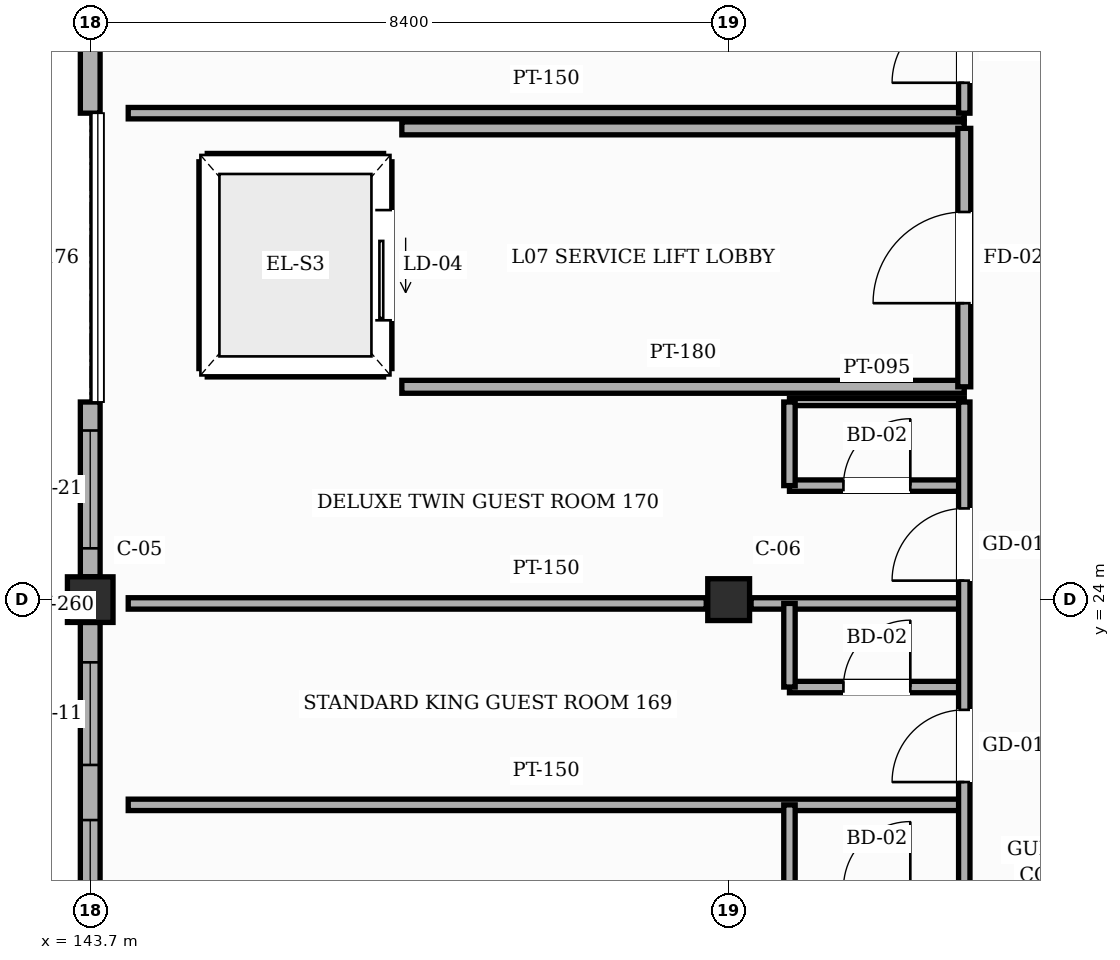
"""IFC4 building model, lengths in metres.
Left out: names, types, materials, properties, quantities, classifications, styles, units other than length and angle.
Written with IfcOpenShell. Run it as: python <this file> out.ifc"""

import sys

from ifc_helpers import new_model, si_unit, direction, frame, frame_2d, origin, origin_2d, place, context, subcontext, project, spatial, rectangle, hollow_rectangle, extrude, element, fill, save


model = new_model("IFC4")
c1 = context("Model", 3, precision=1e-05, world=origin(), true_north=direction((0.0, 1.0)))
c2 = subcontext(c1, "Body", "Model", "MODEL_VIEW")
j1 = project(units=[si_unit("LENGTHUNIT", "METRE"), si_unit("PLANEANGLEUNIT", "RADIAN")], contexts=[c1])
p1 = place(None, origin())
s1 = spatial("IfcSite", under=j1, at=p1, CompositionType="ELEMENT")
p2 = place(p1, origin())
s2 = spatial("IfcBuilding", under=s1, at=p2, CompositionType="ELEMENT")
p3 = place(p2, frame((0.0, 0.0, 31.8)))
s3 = spatial("IfcBuildingStorey", under=s2, at=p3, CompositionType="ELEMENT", Elevation=31.8)
p4 = place(p3, frame((143.7, 24.0, 0.0), z_axis=(0.0, 0.0, 1.0), x_axis=(1.0, 0.0, 0.0)))
e1 = element("IfcColumn", 1, at=p4, inside=s3, PredefinedType="COLUMN", context=c2, shape_type="SweptSolid", body=[
    extrude(hollow_rectangle(XDim=0.6, YDim=0.6, WallThickness=0.025, InnerFilletRadius=0.025, OuterFilletRadius=0.05, at=origin_2d()), origin(), (0.0, 0.0, 1.0), 3.6),
])
p5 = place(p3, frame((152.1, 24.0, 0.0), z_axis=(0.0, 0.0, 1.0), x_axis=(1.0, 0.0, 0.0)))
e2 = element("IfcColumn", 2, at=p5, inside=s3, PredefinedType="COLUMN", context=c2, shape_type="SweptSolid", body=[
    extrude(hollow_rectangle(XDim=0.55, YDim=0.55, WallThickness=0.022, InnerFilletRadius=0.022, OuterFilletRadius=0.044, at=origin_2d()), origin(), (0.0, 0.0, 1.0), 3.6),
])
p6 = place(p3, frame((143.7, 16.3, 0.0), z_axis=(0.0, 0.0, 1.0), x_axis=(0.0, 1.0, 0.0)))
e3 = element("IfcWall", 3, at=p6, inside=s3, PredefinedType="SOLIDWALL", context=c2, shape_type="SweptSolid", body=[
    extrude(rectangle(XDim=7.4, YDim=0.26, at=frame_2d((3.7, 0.0))), origin(), (0.0, 0.0, 1.0), 2.805),
])
p7 = place(p6, frame((0.2, 0.0, 0.85)))
e4 = element("IfcOpeningElement", 4, at=p7, cuts=e3, PredefinedType="OPENING", context=c2, shape_type="SweptSolid", body=[
    extrude(rectangle(XDim=1.95, YDim=1.65, at=frame_2d((0.975, 0.825))), frame((0.0, 0.14, 0.0), z_axis=(0.0, -1.0, 0.0), x_axis=(1.0, 0.0, 0.0)), (0.0, 0.0, 1.0), 0.28),
])
p8 = place(p6, frame((2.55, 0.0, 0.85)))
e5 = element("IfcOpeningElement", 5, at=p8, cuts=e3, PredefinedType="OPENING", context=c2, shape_type="SweptSolid", body=[
    extrude(rectangle(XDim=2.25, YDim=1.65, at=frame_2d((1.125, 0.825))), frame((0.0, 0.14, 0.0), z_axis=(0.0, -1.0, 0.0), x_axis=(1.0, 0.0, 0.0)), (0.0, 0.0, 1.0), 0.28),
])
p9 = place(p6, frame((5.525, 0.0, 0.85)))
e6 = element("IfcOpeningElement", 6, at=p9, cuts=e3, PredefinedType="OPENING", context=c2, shape_type="SweptSolid", body=[
    extrude(rectangle(XDim=1.35, YDim=1.35, at=frame_2d((0.675, 0.675))), frame((0.0, 0.14, 0.0), z_axis=(0.0, -1.0, 0.0), x_axis=(1.0, 0.0, 0.0)), (0.0, 0.0, 1.0), 0.28),
])
p10 = place(p3, frame((143.7, 24.3, 0.0), z_axis=(0.0, 0.0, 1.0), x_axis=(0.0, 1.0, 0.0)))
e7 = element("IfcWall", 7, at=p10, inside=s3, PredefinedType="SOLIDWALL", context=c2, shape_type="SweptSolid", body=[
    extrude(rectangle(XDim=2.3, YDim=0.26, at=frame_2d((1.15, 0.0))), origin(), (0.0, 0.0, 1.0), 2.805),
])
p11 = place(p10, frame((0.375, 0.0, 0.85)))
e8 = element("IfcOpeningElement", 8, at=p11, cuts=e7, PredefinedType="OPENING", context=c2, shape_type="SweptSolid", body=[
    extrude(rectangle(XDim=1.55, YDim=1.35, at=frame_2d((0.775, 0.675))), frame((0.0, 0.14, 0.0), z_axis=(0.0, -1.0, 0.0), x_axis=(1.0, 0.0, 0.0)), (0.0, 0.0, 1.0), 0.28),
])
p12 = place(p3, frame((143.7, 30.4, 0.0), z_axis=(0.0, 0.0, 1.0), x_axis=(0.0, 1.0, 0.0)))
e9 = element("IfcWall", 9, at=p12, inside=s3, PredefinedType="SOLIDWALL", context=c2, shape_type="SweptSolid", body=[
    extrude(rectangle(XDim=1.3, YDim=0.26, at=frame_2d((0.65, 0.0))), origin(), (0.0, 0.0, 1.0), 2.805),
])
for number, where, z_axis, x_axis in (
    (10, (145.24, 29.76, 0.0), (0.0, 0.0, 1.0), (1.0, 0.0, 0.0)),
    (11, (145.24, 27.04, 0.0), (0.0, 0.0, 1.0), (1.0, 0.0, 0.0)),
):
    element("IfcWall", number, at=place(p3, frame(where, z_axis=z_axis, x_axis=x_axis)), inside=s3, PredefinedType="SHEAR", context=c2, shape_type="SweptSolid", body=[
        extrude(rectangle(XDim=2.32, YDim=0.22, at=frame_2d((1.16, 0.0))), origin(), (0.0, 0.0, 1.0), 3.38),
    ])
p13 = place(p3, frame((147.56, 27.04, 0.0), z_axis=(0.0, 0.0, 1.0), x_axis=(0.0, 1.0, 0.0)))
e12 = element("IfcWall", 12, at=p13, inside=s3, PredefinedType="SHEAR", context=c2, shape_type="SweptSolid", body=[
    extrude(rectangle(XDim=2.72, YDim=0.22, at=frame_2d((1.36, 0.0))), origin(), (0.0, 0.0, 1.0), 3.38),
])
p14 = place(p13, frame((0.635, 0.0, 0.0)))
e13 = element("IfcOpeningElement", 13, at=p14, cuts=e12, PredefinedType="OPENING", context=c2, shape_type="SweptSolid", body=[
    extrude(rectangle(XDim=1.45, YDim=2.35, at=frame_2d((0.725, 1.175))), frame((0.0, 0.12, 0.0), z_axis=(0.0, -1.0, 0.0), x_axis=(1.0, 0.0, 0.0)), (0.0, 0.0, 1.0), 0.24),
])
p15 = place(p3, frame((145.24, 27.04, 0.0), z_axis=(0.0, 0.0, 1.0), x_axis=(0.0, 1.0, 0.0)))
e14 = element("IfcWall", 14, at=p15, inside=s3, PredefinedType="SHEAR", context=c2, shape_type="SweptSolid", body=[
    extrude(rectangle(XDim=2.72, YDim=0.22, at=frame_2d((1.36, 0.0))), origin(), (0.0, 0.0, 1.0), 3.38),
])
p16 = place(p3, frame((144.2, 21.3, 0.0), z_axis=(0.0, 0.0, 1.0), x_axis=(1.0, 0.0, 0.0)))
e15 = element("IfcWall", 15, at=p16, inside=s3, PredefinedType="PARTITIONING", context=c2, shape_type="SweptSolid", body=[
    extrude(rectangle(XDim=11.0, YDim=0.15, at=frame_2d((5.5, 0.0))), origin(), (0.0, 0.0, 1.0), 3.365),
])
p17 = place(p3, frame((152.9, 22.85, 0.0), z_axis=(0.0, 0.0, 1.0), x_axis=(1.0, 0.0, 0.0)))
e16 = element("IfcWall", 16, at=p17, inside=s3, PredefinedType="PARTITIONING", context=c2, shape_type="SweptSolid", body=[
    extrude(rectangle(XDim=2.3, YDim=0.15, at=frame_2d((1.15, 0.0))), origin(), (0.0, 0.0, 1.0), 3.365),
])
p18 = place(p17, frame((0.71, 0.0, 0.0)))
e17 = element("IfcOpeningElement", 17, at=p18, cuts=e16, PredefinedType="OPENING", context=c2, shape_type="SweptSolid", body=[
    extrude(rectangle(XDim=0.88, YDim=2.12, at=frame_2d((0.44, 1.06))), frame((0.0, 0.085, 0.0), z_axis=(0.0, -1.0, 0.0), x_axis=(1.0, 0.0, 0.0)), (0.0, 0.0, 1.0), 0.17),
])
p19 = place(p3, frame((144.2, 23.95, 0.0), z_axis=(0.0, 0.0, 1.0), x_axis=(1.0, 0.0, 0.0)))
e18 = element("IfcWall", 18, at=p19, inside=s3, PredefinedType="PARTITIONING", context=c2, shape_type="SweptSolid", body=[
    extrude(rectangle(XDim=7.605, YDim=0.15, at=frame_2d((3.802, 0.0))), origin(), (0.0, 0.0, 1.0), 2.755),
])
p20 = place(p3, frame((152.395, 23.95, 0.0), z_axis=(0.0, 0.0, 1.0), x_axis=(1.0, 0.0, 0.0)))
e19 = element("IfcWall", 19, at=p20, inside=s3, PredefinedType="PARTITIONING", context=c2, shape_type="SweptSolid", body=[
    extrude(rectangle(XDim=2.805, YDim=0.15, at=frame_2d((1.402, 0.0))), origin(), (0.0, 0.0, 1.0), 2.755),
])
p21 = place(p3, frame((152.9, 25.5, 0.0), z_axis=(0.0, 0.0, 1.0), x_axis=(1.0, 0.0, 0.0)))
e20 = element("IfcWall", 20, at=p21, inside=s3, PredefinedType="PARTITIONING", context=c2, shape_type="SweptSolid", body=[
    extrude(rectangle(XDim=2.3, YDim=0.15, at=frame_2d((1.15, 0.0))), origin(), (0.0, 0.0, 1.0), 3.365),
])
p22 = place(p21, frame((0.71, 0.0, 0.0)))
e21 = element("IfcOpeningElement", 21, at=p22, cuts=e20, PredefinedType="OPENING", context=c2, shape_type="SweptSolid", body=[
    extrude(rectangle(XDim=0.88, YDim=2.12, at=frame_2d((0.44, 1.06))), frame((0.0, 0.085, 0.0), z_axis=(0.0, -1.0, 0.0), x_axis=(1.0, 0.0, 0.0)), (0.0, 0.0, 1.0), 0.17),
])
p23 = place(p3, frame((152.9, 26.6, 0.0), z_axis=(0.0, 0.0, 1.0), x_axis=(1.0, 0.0, 0.0)))
e22 = element("IfcWall", 22, at=p23, inside=s3, PredefinedType="PARTITIONING", context=c2, shape_type="SweptSolid", body=[
    extrude(rectangle(XDim=2.3, YDim=0.095, at=frame_2d((1.15, 0.0))), origin(), (0.0, 0.0, 1.0), 3.365),
])
for number, where, z_axis, x_axis in (
    (23, (147.8, 26.8, 0.0), (0.0, 0.0, 1.0), (1.0, 0.0, 0.0)),
    (24, (147.8, 30.2, 0.0), (0.0, 0.0, 1.0), (1.0, 0.0, 0.0)),
):
    element("IfcWall", number, at=place(p3, frame(where, z_axis=z_axis, x_axis=x_axis)), inside=s3, PredefinedType="PARTITIONING", context=c2, shape_type="SweptSolid", body=[
        extrude(rectangle(XDim=7.4, YDim=0.17, at=frame_2d((3.7, 0.0))), origin(), (0.0, 0.0, 1.0), 3.365),
    ])
p24 = place(p3, frame((144.2, 30.4, 0.0), z_axis=(0.0, 0.0, 1.0), x_axis=(1.0, 0.0, 0.0)))
e25 = element("IfcWall", 25, at=p24, inside=s3, PredefinedType="PARTITIONING", context=c2, shape_type="SweptSolid", body=[
    extrude(rectangle(XDim=11.0, YDim=0.15, at=frame_2d((5.5, 0.0))), origin(), (0.0, 0.0, 1.0), 3.365),
])
p25 = place(p3, frame((152.9, 20.2, 0.0), z_axis=(0.0, 0.0, 1.0), x_axis=(0.0, 1.0, 0.0)))
e26 = element("IfcWall", 26, at=p25, inside=s3, PredefinedType="PARTITIONING", context=c2, shape_type="SweptSolid", body=[
    extrude(rectangle(XDim=1.1, YDim=0.15, at=frame_2d((0.55, 0.0))), origin(), (0.0, 0.0, 1.0), 3.365),
])
p26 = place(p3, frame((152.9, 22.85, 0.0), z_axis=(0.0, 0.0, 1.0), x_axis=(0.0, 1.0, 0.0)))
e27 = element("IfcWall", 27, at=p26, inside=s3, PredefinedType="PARTITIONING", context=c2, shape_type="SweptSolid", body=[
    extrude(rectangle(XDim=1.1, YDim=0.15, at=frame_2d((0.55, 0.0))), origin(), (0.0, 0.0, 1.0), 3.365),
])
p27 = place(p3, frame((152.9, 25.5, 0.0), z_axis=(0.0, 0.0, 1.0), x_axis=(0.0, 1.0, 0.0)))
e28 = element("IfcWall", 28, at=p27, inside=s3, PredefinedType="PARTITIONING", context=c2, shape_type="SweptSolid", body=[
    extrude(rectangle(XDim=1.1, YDim=0.15, at=frame_2d((0.55, 0.0))), origin(), (0.0, 0.0, 1.0), 3.365),
])
p28 = place(p3, frame((155.2, 8.4, 0.0), z_axis=(0.0, 0.0, 1.0), x_axis=(0.0, 1.0, 0.0)))
e29 = element("IfcWall", 29, at=p28, inside=s3, PredefinedType="PARTITIONING", context=c2, shape_type="SweptSolid", body=[
    extrude(rectangle(XDim=18.2, YDim=0.15, at=frame_2d((9.1, 0.0))), origin(), (0.0, 0.0, 1.0), 3.365),
])
p29 = place(p28, frame((3.05, 0.0, 0.0)))
e30 = element("IfcOpeningElement", 30, at=p29, cuts=e29, PredefinedType="OPENING", context=c2, shape_type="SweptSolid", body=[
    extrude(rectangle(XDim=1.5, YDim=2.3, at=frame_2d((0.75, 1.15))), frame((0.0, 0.085, 0.0), z_axis=(0.0, -1.0, 0.0), x_axis=(1.0, 0.0, 0.0)), (0.0, 0.0, 1.0), 0.17),
])
p30 = place(p28, frame((7.825, 0.0, 0.0)))
e31 = element("IfcOpeningElement", 31, at=p30, cuts=e29, PredefinedType="OPENING", context=c2, shape_type="SweptSolid", body=[
    extrude(rectangle(XDim=1.1, YDim=2.2, at=frame_2d((0.55, 1.1))), frame((0.0, 0.085, 0.0), z_axis=(0.0, -1.0, 0.0), x_axis=(1.0, 0.0, 0.0)), (0.0, 0.0, 1.0), 0.17),
])
p31 = place(p28, frame((10.55, 0.0, 0.0)))
e32 = element("IfcOpeningElement", 32, at=p31, cuts=e29, PredefinedType="OPENING", context=c2, shape_type="SweptSolid", body=[
    extrude(rectangle(XDim=0.95, YDim=2.15, at=frame_2d((0.475, 1.075))), frame((0.0, 0.085, 0.0), z_axis=(0.0, -1.0, 0.0), x_axis=(1.0, 0.0, 0.0)), (0.0, 0.0, 1.0), 0.17),
])
p32 = place(p28, frame((13.2, 0.0, 0.0)))
e33 = element("IfcOpeningElement", 33, at=p32, cuts=e29, PredefinedType="OPENING", context=c2, shape_type="SweptSolid", body=[
    extrude(rectangle(XDim=0.95, YDim=2.15, at=frame_2d((0.475, 1.075))), frame((0.0, 0.085, 0.0), z_axis=(0.0, -1.0, 0.0), x_axis=(1.0, 0.0, 0.0)), (0.0, 0.0, 1.0), 0.17),
])
p33 = place(p28, frame((15.85, 0.0, 0.0)))
e34 = element("IfcOpeningElement", 34, at=p33, cuts=e29, PredefinedType="OPENING", context=c2, shape_type="SweptSolid", body=[
    extrude(rectangle(XDim=0.95, YDim=2.15, at=frame_2d((0.475, 1.075))), frame((0.0, 0.085, 0.0), z_axis=(0.0, -1.0, 0.0), x_axis=(1.0, 0.0, 0.0)), (0.0, 0.0, 1.0), 0.17),
])
p34 = place(p3, frame((155.2, 26.8, 0.0), z_axis=(0.0, 0.0, 1.0), x_axis=(0.0, 1.0, 0.0)))
e35 = element("IfcWall", 35, at=p34, inside=s3, PredefinedType="PARTITIONING", context=c2, shape_type="SweptSolid", body=[
    extrude(rectangle(XDim=3.4, YDim=0.17, at=frame_2d((1.7, 0.0))), origin(), (0.0, 0.0, 1.0), 3.365),
])
p35 = place(p34, frame((1.1, 0.0, 0.0)))
e36 = element("IfcOpeningElement", 36, at=p35, cuts=e35, PredefinedType="OPENING", context=c2, shape_type="SweptSolid", body=[
    extrude(rectangle(XDim=1.2, YDim=2.2, at=frame_2d((0.6, 1.1))), frame((0.0, 0.095, 0.0), z_axis=(0.0, -1.0, 0.0), x_axis=(1.0, 0.0, 0.0)), (0.0, 0.0, 1.0), 0.19),
])
p36 = place(p3, frame((155.2, 30.4, 0.0), z_axis=(0.0, 0.0, 1.0), x_axis=(0.0, 1.0, 0.0)))
e37 = element("IfcWall", 37, at=p36, inside=s3, PredefinedType="PARTITIONING", context=c2, shape_type="SweptSolid", body=[
    extrude(rectangle(XDim=10.2, YDim=0.15, at=frame_2d((5.1, 0.0))), origin(), (0.0, 0.0, 1.0), 3.365),
])
p37 = place(p36, frame((0.4, 0.0, 0.0)))
e38 = element("IfcOpeningElement", 38, at=p37, cuts=e37, PredefinedType="OPENING", context=c2, shape_type="SweptSolid", body=[
    extrude(rectangle(XDim=0.95, YDim=2.15, at=frame_2d((0.475, 1.075))), frame((0.0, 0.085, 0.0), z_axis=(0.0, -1.0, 0.0), x_axis=(1.0, 0.0, 0.0)), (0.0, 0.0, 1.0), 0.17),
])
p38 = place(p36, frame((3.8, 0.0, 0.0)))
e39 = element("IfcOpeningElement", 39, at=p38, cuts=e37, PredefinedType="OPENING", context=c2, shape_type="SweptSolid", body=[
    extrude(rectangle(XDim=0.95, YDim=2.15, at=frame_2d((0.475, 1.075))), frame((0.0, 0.085, 0.0), z_axis=(0.0, -1.0, 0.0), x_axis=(1.0, 0.0, 0.0)), (0.0, 0.0, 1.0), 0.17),
])
p39 = place(p36, frame((7.2, 0.0, 0.0)))
e40 = element("IfcOpeningElement", 40, at=p39, cuts=e37, PredefinedType="OPENING", context=c2, shape_type="SweptSolid", body=[
    extrude(rectangle(XDim=0.95, YDim=2.15, at=frame_2d((0.475, 1.075))), frame((0.0, 0.085, 0.0), z_axis=(0.0, -1.0, 0.0), x_axis=(1.0, 0.0, 0.0)), (0.0, 0.0, 1.0), 0.17),
])
p40 = place(p8, origin())
e41 = element("IfcWindow", 41, at=p40, inside=s3, PartitioningType="SINGLE_PANEL", PredefinedType="WINDOW", context=c2, shape_type="SweptSolid", body=[
    extrude(rectangle(XDim=2.25, YDim=1.65, at=frame_2d((1.125, 0.825))), frame((0.0, 0.03, 0.0), z_axis=(0.0, -1.0, 0.0), x_axis=(1.0, 0.0, 0.0)), (0.0, 0.0, 1.0), 0.06),
])
fill(e5, e41)
p41 = place(p9, origin())
e42 = element("IfcWindow", 42, at=p41, inside=s3, PartitioningType="SINGLE_PANEL", PredefinedType="WINDOW", context=c2, shape_type="SweptSolid", body=[
    extrude(rectangle(XDim=1.35, YDim=1.35, at=frame_2d((0.675, 0.675))), frame((0.0, 0.03, 0.0), z_axis=(0.0, -1.0, 0.0), x_axis=(1.0, 0.0, 0.0)), (0.0, 0.0, 1.0), 0.06),
])
fill(e6, e42)
p42 = place(p11, origin())
e43 = element("IfcWindow", 43, at=p42, inside=s3, PartitioningType="SINGLE_PANEL", PredefinedType="WINDOW", context=c2, shape_type="SweptSolid", body=[
    extrude(rectangle(XDim=1.55, YDim=1.35, at=frame_2d((0.775, 0.675))), frame((0.0, 0.03, 0.0), z_axis=(0.0, -1.0, 0.0), x_axis=(1.0, 0.0, 0.0)), (0.0, 0.0, 1.0), 0.06),
])
fill(e8, e43)
p43 = place(p14, origin())
e44 = element("IfcDoor", 44, at=p43, inside=s3, OperationType="SLIDING_TO_LEFT", PredefinedType="DOOR", context=c2, shape_type="SweptSolid", body=[
    extrude(rectangle(XDim=1.45, YDim=2.35, at=frame_2d((0.725, 1.175))), frame((0.0, 0.025, 0.0), z_axis=(0.0, -1.0, 0.0), x_axis=(1.0, 0.0, 0.0)), (0.0, 0.0, 1.0), 0.05),
])
fill(e13, e44)
p44 = place(p35, origin())
e45 = element("IfcDoor", 45, at=p44, inside=s3, OperationType="SINGLE_SWING_LEFT", PredefinedType="DOOR", context=c2, shape_type="SweptSolid", body=[
    extrude(rectangle(XDim=1.2, YDim=2.2, at=frame_2d((0.6, 1.1))), frame((0.0, 0.025, 0.0), z_axis=(0.0, -1.0, 0.0), x_axis=(1.0, 0.0, 0.0)), (0.0, 0.0, 1.0), 0.05),
])
fill(e36, e45)
p45 = place(p32, origin())
e46 = element("IfcDoor", 46, at=p45, inside=s3, OperationType="SINGLE_SWING_LEFT", PredefinedType="DOOR", context=c2, shape_type="SweptSolid", body=[
    extrude(rectangle(XDim=0.95, YDim=2.15, at=frame_2d((0.475, 1.075))), frame((0.0, 0.025, 0.0), z_axis=(0.0, -1.0, 0.0), x_axis=(1.0, 0.0, 0.0)), (0.0, 0.0, 1.0), 0.05),
])
fill(e33, e46)
p46 = place(p18, origin())
e47 = element("IfcDoor", 47, at=p46, inside=s3, OperationType="SINGLE_SWING_RIGHT", PredefinedType="DOOR", context=c2, shape_type="SweptSolid", body=[
    extrude(rectangle(XDim=0.88, YDim=2.12, at=frame_2d((0.44, 1.06))), frame((0.0, 0.025, 0.0), z_axis=(0.0, -1.0, 0.0), x_axis=(1.0, 0.0, 0.0)), (0.0, 0.0, 1.0), 0.05),
])
fill(e17, e47)
p47 = place(p33, origin())
e48 = element("IfcDoor", 48, at=p47, inside=s3, OperationType="SINGLE_SWING_LEFT", PredefinedType="DOOR", context=c2, shape_type="SweptSolid", body=[
    extrude(rectangle(XDim=0.95, YDim=2.15, at=frame_2d((0.475, 1.075))), frame((0.0, 0.025, 0.0), z_axis=(0.0, -1.0, 0.0), x_axis=(1.0, 0.0, 0.0)), (0.0, 0.0, 1.0), 0.05),
])
fill(e34, e48)
p48 = place(p22, origin())
e49 = element("IfcDoor", 49, at=p48, inside=s3, OperationType="SINGLE_SWING_RIGHT", PredefinedType="DOOR", context=c2, shape_type="SweptSolid", body=[
    extrude(rectangle(XDim=0.88, YDim=2.12, at=frame_2d((0.44, 1.06))), frame((0.0, 0.025, 0.0), z_axis=(0.0, -1.0, 0.0), x_axis=(1.0, 0.0, 0.0)), (0.0, 0.0, 1.0), 0.05),
])
fill(e21, e49)
p49 = place(p37, origin())
e50 = element("IfcDoor", 50, at=p49, inside=s3, OperationType="SINGLE_SWING_LEFT", PredefinedType="DOOR", context=c2, shape_type="SweptSolid", body=[
    extrude(rectangle(XDim=0.95, YDim=2.15, at=frame_2d((0.475, 1.075))), frame((0.0, 0.025, 0.0), z_axis=(0.0, -1.0, 0.0), x_axis=(1.0, 0.0, 0.0)), (0.0, 0.0, 1.0), 0.05),
])
fill(e38, e50)
save(model, sys.argv[1])
